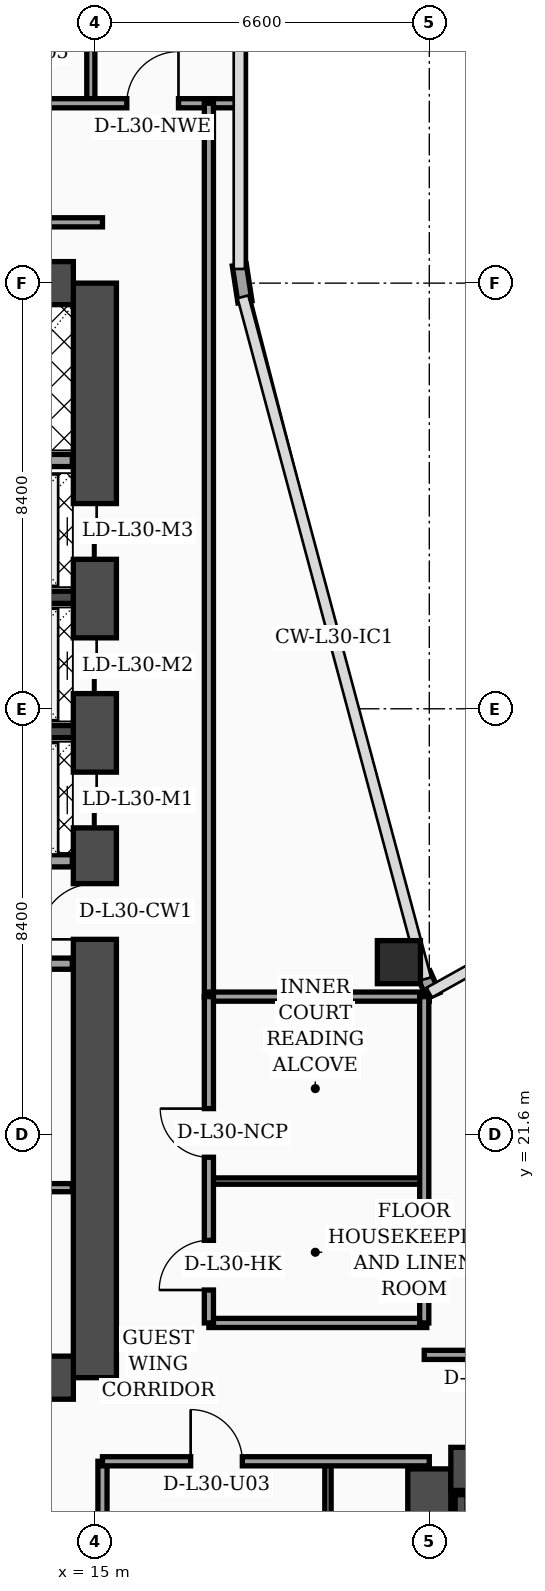
"""IFC4 building model, lengths in metres.
Left out: names, types, materials, properties, quantities, classifications, styles, units other than length and angle.
Written with IfcOpenShell. Run it as: python <this file> out.ifc"""

import sys

from ifc_helpers import new_model, si_unit, direction, frame, frame_2d, origin, origin_2d, place, context, subcontext, project, spatial, rectangle, hollow_rectangle, extrude, element, fill, save


model = new_model("IFC4")
c1 = context("Model", 3, precision=1e-05, world=origin(), true_north=direction((0.0, 1.0)))
c2 = subcontext(c1, "Body", "Model", "MODEL_VIEW")
j1 = project(units=[si_unit("LENGTHUNIT", "METRE"), si_unit("PLANEANGLEUNIT", "RADIAN")], contexts=[c1])
p1 = place(None, origin())
s1 = spatial("IfcSite", under=j1, at=p1, CompositionType="ELEMENT")
p2 = place(p1, origin())
s2 = spatial("IfcBuilding", under=s1, at=p2, CompositionType="ELEMENT")
p3 = place(p2, frame((0.0, 0.0, 124.0)))
s3 = spatial("IfcBuildingStorey", under=s2, at=p3, CompositionType="ELEMENT", Elevation=124.0)
p4 = place(p3, frame((15.0, 16.8, 0.0), z_axis=(0.0, 0.0, 1.0), x_axis=(0.0, 1.0, 0.0)))
e1 = element("IfcWall", 1, at=p4, inside=s3, PredefinedType="SHEAR", context=c2, shape_type="SweptSolid", body=[
    extrude(rectangle(XDim=21.6, YDim=0.85, at=frame_2d((10.8, 0.0))), origin(), (0.0, 0.0, 1.0), 3.56),
])
p5 = place(p4, frame((8.65, 0.0, 0.0)))
e2 = element("IfcOpeningElement", 2, at=p5, cuts=e1, PredefinedType="OPENING", context=c2, shape_type="SweptSolid", body=[
    extrude(rectangle(XDim=1.1, YDim=2.2, at=frame_2d((0.55, 1.1))), frame((0.0, 0.435, 0.0), z_axis=(0.0, -1.0, 0.0), x_axis=(1.0, 0.0, 0.0)), (0.0, 0.0, 1.0), 0.87),
])
p6 = place(p4, frame((10.85, 0.0, 0.0)))
e3 = element("IfcOpeningElement", 3, at=p6, cuts=e1, PredefinedType="OPENING", context=c2, shape_type="SweptSolid", body=[
    extrude(rectangle(XDim=1.1, YDim=2.2, at=frame_2d((0.55, 1.1))), frame((0.0, 0.435, 0.0), z_axis=(0.0, -1.0, 0.0), x_axis=(1.0, 0.0, 0.0)), (0.0, 0.0, 1.0), 0.87),
])
p7 = place(p4, frame((13.5, 0.0, 0.0)))
e4 = element("IfcOpeningElement", 4, at=p7, cuts=e1, PredefinedType="OPENING", context=c2, shape_type="SweptSolid", body=[
    extrude(rectangle(XDim=1.1, YDim=2.2, at=frame_2d((0.55, 1.1))), frame((0.0, 0.435, 0.0), z_axis=(0.0, -1.0, 0.0), x_axis=(1.0, 0.0, 0.0)), (0.0, 0.0, 1.0), 0.87),
])
p8 = place(p4, frame((16.15, 0.0, 0.0)))
e5 = element("IfcOpeningElement", 5, at=p8, cuts=e1, PredefinedType="OPENING", context=c2, shape_type="SweptSolid", body=[
    extrude(rectangle(XDim=1.1, YDim=2.2, at=frame_2d((0.55, 1.1))), frame((0.0, 0.435, 0.0), z_axis=(0.0, -1.0, 0.0), x_axis=(1.0, 0.0, 0.0)), (0.0, 0.0, 1.0), 0.87),
])
for number, where, z_axis, x_axis in (
    (6, (4.625, 38.4, 0.0), (0.0, 0.0, 1.0), (1.0, 0.0, 0.0)),
    (7, (4.625, 16.8, 0.0), (0.0, 0.0, 1.0), (1.0, 0.0, 0.0)),
):
    element("IfcWall", number, at=place(p3, frame(where, z_axis=z_axis, x_axis=x_axis)), inside=s3, PredefinedType="SHEAR", context=c2, shape_type="SweptSolid", body=[
        extrude(rectangle(XDim=9.95, YDim=0.85, at=frame_2d((4.975, 0.0))), origin(), (0.0, 0.0, 1.0), 3.56),
    ])
p9 = place(p3, frame((21.6, 4.6, 0.0), z_axis=(0.0, 0.0, 1.0), x_axis=(0.0, 1.0, 0.0)))
e8 = element("IfcWall", 8, at=p9, inside=s3, PredefinedType="SHEAR", context=c2, shape_type="SweptSolid", body=[
    extrude(rectangle(XDim=10.4, YDim=0.85, at=frame_2d((5.2, 0.0))), origin(), (0.0, 0.0, 1.0), 3.56),
])
p10 = place(p3, frame((22.025, 15.0, 0.0), z_axis=(0.0, 0.0, 1.0), x_axis=(1.0, 0.0, 0.0)))
e9 = element("IfcWall", 9, at=p10, inside=s3, PredefinedType="SHEAR", context=c2, shape_type="SweptSolid", body=[
    extrude(rectangle(XDim=9.95, YDim=0.85, at=frame_2d((4.975, 0.0))), origin(), (0.0, 0.0, 1.0), 3.56),
])
p11 = place(p10, frame((4.88, 0.0, 0.0)))
e10 = element("IfcOpeningElement", 10, at=p11, cuts=e9, PredefinedType="OPENING", context=c2, shape_type="SweptSolid", body=[
    extrude(rectangle(XDim=1.1, YDim=2.2, at=frame_2d((0.55, 1.1))), frame((0.0, 0.435, 0.0), z_axis=(0.0, -1.0, 0.0), x_axis=(1.0, 0.0, 0.0)), (0.0, 0.0, 1.0), 0.87),
])
p12 = place(p3, frame((22.23, 5.025, 0.0), z_axis=(0.0, 0.0, 1.0), x_axis=(0.0, 1.0, 0.0)))
e11 = element("IfcWall", 11, at=p12, inside=s3, PredefinedType="SOLIDWALL", context=c2, shape_type="SweptSolid", body=[
    extrude(rectangle(XDim=9.465, YDim=0.24, at=frame_2d((4.732, 0.0))), origin(), (0.0, 0.0, 1.0), 3.56),
])
for number, where, z_axis, x_axis in (
    (12, (12.18, 29.55, 0.0), (0.0, 0.0, 1.0), (1.0, 0.0, 0.0)),
    (13, (12.18, 32.2, 0.0), (0.0, 0.0, 1.0), (1.0, 0.0, 0.0)),
):
    element("IfcWall", number, at=place(p3, frame(where, z_axis=z_axis, x_axis=x_axis)), inside=s3, PredefinedType="SOLIDWALL", context=c2, shape_type="SweptSolid", body=[
        extrude(rectangle(XDim=2.395, YDim=0.24, at=frame_2d((1.198, 0.0))), origin(), (0.0, 0.0, 1.0), 3.56),
    ])
p13 = place(p3, frame((21.0, 25.0, 0.0), z_axis=(0.0, 0.0, 1.0), x_axis=(1.0, 0.0, 0.0)))
e14 = element("IfcColumn", 14, at=p13, inside=s3, PredefinedType="COLUMN", context=c2, shape_type="SweptSolid", body=[
    extrude(hollow_rectangle(XDim=0.85, YDim=0.85, WallThickness=0.036, at=origin_2d()), origin(), (0.0, 0.0, 1.0), 3.56),
])
p14 = place(p3, frame((21.68, 24.34, 0.0), z_axis=(0.0, 0.0, 1.0), x_axis=(-0.40758134973, 0.913168901875, 0.0)))
e15 = element("IfcWall", 15, at=p14, inside=s3, PredefinedType="SOLIDWALL", context=c2, shape_type="SweptSolid", body=[
    extrude(rectangle(XDim=0.471, YDim=0.28, at=frame_2d((0.235, 0.0))), origin(), (0.0, 0.0, 1.0), 3.56),
])
p15 = place(p3, frame((17.962, 38.03, 0.0), z_axis=(0.0, 0.0, 1.0), x_axis=(-0.15141125477, 0.988470855377, 0.0)))
e16 = element("IfcWall", 16, at=p15, inside=s3, PredefinedType="SOLIDWALL", context=c2, shape_type="SweptSolid", body=[
    extrude(rectangle(XDim=0.739, YDim=0.28, at=frame_2d((0.369, 0.0))), origin(), (0.0, 0.0, 1.0), 3.56),
])
p16 = place(p3, frame((9.68, 20.55, 0.0), z_axis=(0.0, 0.0, 1.0), x_axis=(1.0, 0.0, 0.0)))
e17 = element("IfcWall", 17, at=p16, inside=s3, PredefinedType="PARTITIONING", context=c2, shape_type="SweptSolid", body=[
    extrude(rectangle(XDim=4.875, YDim=0.16, at=frame_2d((2.438, 0.0))), origin(), (0.0, 0.0, 1.0), 3.56),
])
p17 = place(p16, frame((1.1, 0.0, 0.0)))
e18 = element("IfcOpeningElement", 18, at=p17, cuts=e17, PredefinedType="OPENING", context=c2, shape_type="SweptSolid", body=[
    extrude(rectangle(XDim=0.98, YDim=2.15, at=frame_2d((0.49, 1.075))), frame((0.0, 0.09, 0.0), z_axis=(0.0, -1.0, 0.0), x_axis=(1.0, 0.0, 0.0)), (0.0, 0.0, 1.0), 0.18),
])
p18 = place(p3, frame((9.68, 24.97, 0.0), z_axis=(0.0, 0.0, 1.0), x_axis=(1.0, 0.0, 0.0)))
e19 = element("IfcWall", 19, at=p18, inside=s3, PredefinedType="SOLIDWALL", context=c2, shape_type="SweptSolid", body=[
    extrude(rectangle(XDim=4.875, YDim=0.22, at=frame_2d((2.438, 0.0))), origin(), (0.0, 0.0, 1.0), 2.84),
])
p19 = place(p18, frame((0.9, 0.0, 0.0)))
e20 = element("IfcOpeningElement", 20, at=p19, cuts=e19, PredefinedType="OPENING", context=c2, shape_type="SweptSolid", body=[
    extrude(rectangle(XDim=0.98, YDim=2.15, at=frame_2d((0.49, 1.075))), frame((0.0, 0.12, 0.0), z_axis=(0.0, -1.0, 0.0), x_axis=(1.0, 0.0, 0.0)), (0.0, 0.0, 1.0), 0.24),
])
p20 = place(p3, frame((12.25, 27.0, 0.0), z_axis=(0.0, 0.0, 1.0), x_axis=(1.0, 0.0, 0.0)))
e21 = element("IfcWall", 21, at=p20, inside=s3, PredefinedType="SOLIDWALL", context=c2, shape_type="SweptSolid", body=[
    extrude(rectangle(XDim=2.305, YDim=0.24, at=frame_2d((1.152, 0.0))), origin(), (0.0, 0.0, 1.0), 3.56),
])
p21 = place(p3, frame((9.66, 34.9, 0.0), z_axis=(0.0, 0.0, 1.0), x_axis=(1.0, 0.0, 0.0)))
e22 = element("IfcWall", 22, at=p21, inside=s3, PredefinedType="SOLIDWALL", context=c2, shape_type="SweptSolid", body=[
    extrude(rectangle(XDim=4.895, YDim=0.24, at=frame_2d((2.448, 0.0))), origin(), (0.0, 0.0, 1.0), 3.56),
])
p22 = place(p3, frame((15.15, 2.44, 0.0), z_axis=(0.0, 0.0, 1.0), x_axis=(0.0, 1.0, 0.0)))
e23 = element("IfcWall", 23, at=p22, inside=s3, PredefinedType="PARTITIONING", context=c2, shape_type="SweptSolid", body=[
    extrude(rectangle(XDim=12.71, YDim=0.18, at=frame_2d((6.355, 0.0))), origin(), (0.0, 0.0, 1.0), 3.04),
])
p23 = place(p3, frame((19.6, 2.44, 0.0), z_axis=(0.0, 0.0, 1.0), x_axis=(0.0, 1.0, 0.0)))
e24 = element("IfcWall", 24, at=p23, inside=s3, PredefinedType="PARTITIONING", context=c2, shape_type="SweptSolid", body=[
    extrude(rectangle(XDim=12.71, YDim=0.125, at=frame_2d((6.355, 0.0))), origin(), (0.0, 0.0, 1.0), 2.49),
])
p24 = place(p23, frame((4.34, 0.0, 0.0)))
e25 = element("IfcOpeningElement", 25, at=p24, cuts=e24, PredefinedType="OPENING", context=c2, shape_type="SweptSolid", body=[
    extrude(rectangle(XDim=0.96, YDim=2.2, at=frame_2d((0.48, 1.1))), frame((0.0, 0.073, 0.0), z_axis=(0.0, -1.0, 0.0), x_axis=(1.0, 0.0, 0.0)), (0.0, 0.0, 1.0), 0.145),
])
p25 = place(p23, frame((10.18, 0.0, 0.0)))
e26 = element("IfcOpeningElement", 26, at=p25, cuts=e24, PredefinedType="OPENING", context=c2, shape_type="SweptSolid", body=[
    extrude(rectangle(XDim=0.9, YDim=2.15, at=frame_2d((0.45, 1.075))), frame((0.0, 0.073, 0.0), z_axis=(0.0, -1.0, 0.0), x_axis=(1.0, 0.0, 0.0)), (0.0, 0.0, 1.0), 0.145),
])
p26 = place(p3, frame((15.15, 15.15, 0.0), z_axis=(0.0, 0.0, 1.0), x_axis=(1.0, 0.0, 0.0)))
e27 = element("IfcWall", 27, at=p26, inside=s3, PredefinedType="PARTITIONING", context=c2, shape_type="SweptSolid", body=[
    extrude(rectangle(XDim=6.45, YDim=0.18, at=frame_2d((3.225, 0.0))), origin(), (0.0, 0.0, 1.0), 2.49),
])
p27 = place(p26, frame((1.74, 0.0, 0.0)))
e28 = element("IfcOpeningElement", 28, at=p27, cuts=e27, PredefinedType="OPENING", context=c2, shape_type="SweptSolid", body=[
    extrude(rectangle(XDim=1.02, YDim=2.2, at=frame_2d((0.51, 1.1))), frame((0.0, 0.1, 0.0), z_axis=(0.0, -1.0, 0.0), x_axis=(1.0, 0.0, 0.0)), (0.0, 0.0, 1.0), 0.2),
])
p28 = place(p3, frame((14.92, 41.95, 0.0), z_axis=(0.0, 0.0, 1.0), x_axis=(0.0, 1.0, 0.0)))
e29 = element("IfcWall", 29, at=p28, inside=s3, PredefinedType="PARTITIONING", context=c2, shape_type="SweptSolid", body=[
    extrude(rectangle(XDim=5.85, YDim=0.16, at=frame_2d((2.925, 0.0))), origin(), (0.0, 0.0, 1.0), 3.04),
])
p29 = place(p3, frame((0.08, 41.95, 0.0), z_axis=(0.0, 0.0, 1.0), x_axis=(1.0, 0.0, 0.0)))
e30 = element("IfcWall", 30, at=p29, inside=s3, PredefinedType="PARTITIONING", context=c2, shape_type="SweptSolid", body=[
    extrude(rectangle(XDim=17.77, YDim=0.18, at=frame_2d((8.885, 0.0))), origin(), (0.0, 0.0, 1.0), 2.84),
])
p30 = place(p29, frame((0.9, 0.0, 0.0)))
e31 = element("IfcOpeningElement", 31, at=p30, cuts=e30, PredefinedType="OPENING", context=c2, shape_type="SweptSolid", body=[
    extrude(rectangle(XDim=1.02, YDim=2.2, at=frame_2d((0.51, 1.1))), frame((0.0, 0.1, 0.0), z_axis=(0.0, -1.0, 0.0), x_axis=(1.0, 0.0, 0.0)), (0.0, 0.0, 1.0), 0.2),
])
p31 = place(p29, frame((4.75, 0.0, 0.0)))
e32 = element("IfcOpeningElement", 32, at=p31, cuts=e30, PredefinedType="OPENING", context=c2, shape_type="SweptSolid", body=[
    extrude(rectangle(XDim=1.02, YDim=2.2, at=frame_2d((0.51, 1.1))), frame((0.0, 0.1, 0.0), z_axis=(0.0, -1.0, 0.0), x_axis=(1.0, 0.0, 0.0)), (0.0, 0.0, 1.0), 0.2),
])
p32 = place(p29, frame((10.63, 0.0, 0.0)))
e33 = element("IfcOpeningElement", 33, at=p32, cuts=e30, PredefinedType="OPENING", context=c2, shape_type="SweptSolid", body=[
    extrude(rectangle(XDim=1.02, YDim=2.2, at=frame_2d((0.51, 1.1))), frame((0.0, 0.1, 0.0), z_axis=(0.0, -1.0, 0.0), x_axis=(1.0, 0.0, 0.0)), (0.0, 0.0, 1.0), 0.2),
])
p33 = place(p29, frame((15.55, 0.0, 0.0)))
e34 = element("IfcOpeningElement", 34, at=p33, cuts=e30, PredefinedType="OPENING", context=c2, shape_type="SweptSolid", body=[
    extrude(rectangle(XDim=1.02, YDim=2.2, at=frame_2d((0.51, 1.1))), frame((0.0, 0.1, 0.0), z_axis=(0.0, -1.0, 0.0), x_axis=(1.0, 0.0, 0.0)), (0.0, 0.0, 1.0), 0.2),
])
p34 = place(p3, frame((17.25, 24.3, 0.0), z_axis=(0.0, 0.0, 1.0), x_axis=(0.0, 1.0, 0.0)))
e35 = element("IfcWall", 35, at=p34, inside=s3, PredefinedType="PARTITIONING", context=c2, shape_type="SweptSolid", body=[
    extrude(rectangle(XDim=17.65, YDim=0.18, at=frame_2d((8.825, 0.0))), origin(), (0.0, 0.0, 1.0), 2.84),
])
p35 = place(p3, frame((3.755, 39.6, 0.0), z_axis=(0.0, 0.0, 1.0), x_axis=(1.0, 0.0, 0.0)))
e36 = element("IfcWall", 36, at=p35, inside=s3, PredefinedType="PARTITIONING", context=c2, shape_type="SweptSolid", body=[
    extrude(rectangle(XDim=11.395, YDim=0.18, at=frame_2d((5.698, 0.0))), origin(), (0.0, 0.0, 1.0), 2.84),
])
p36 = place(p3, frame((17.25, 17.88, 0.0), z_axis=(0.0, 0.0, 1.0), x_axis=(1.0, 0.0, 0.0)))
e37 = element("IfcWall", 37, at=p36, inside=s3, PredefinedType="PARTITIONING", context=c2, shape_type="SweptSolid", body=[
    extrude(rectangle(XDim=4.3, YDim=0.18, at=frame_2d((2.15, 0.0))), origin(), (0.0, 0.0, 1.0), 3.09),
])
p37 = place(p3, frame((17.25, 20.68, 0.0), z_axis=(0.0, 0.0, 1.0), x_axis=(1.0, 0.0, 0.0)))
e38 = element("IfcWall", 38, at=p37, inside=s3, PredefinedType="PARTITIONING", context=c2, shape_type="SweptSolid", body=[
    extrude(rectangle(XDim=4.3, YDim=0.125, at=frame_2d((2.15, 0.0))), origin(), (0.0, 0.0, 1.0), 3.56),
])
p38 = place(p3, frame((17.25, 24.32, 0.0), z_axis=(0.0, 0.0, 1.0), x_axis=(1.0, 0.0, 0.0)))
e39 = element("IfcWall", 39, at=p38, inside=s3, PredefinedType="PARTITIONING", context=c2, shape_type="SweptSolid", body=[
    extrude(rectangle(XDim=4.35, YDim=0.18, at=frame_2d((2.175, 0.0))), origin(), (0.0, 0.0, 1.0), 3.56),
])
p39 = place(p3, frame((21.5, 17.88, 0.0), z_axis=(0.0, 0.0, 1.0), x_axis=(0.0, 1.0, 0.0)))
e40 = element("IfcWall", 40, at=p39, inside=s3, PredefinedType="PARTITIONING", context=c2, shape_type="SweptSolid", body=[
    extrude(rectangle(XDim=6.44, YDim=0.18, at=frame_2d((3.22, 0.0))), origin(), (0.0, 0.0, 1.0), 3.09),
])
p40 = place(p3, frame((17.25, 17.88, 0.0), z_axis=(0.0, 0.0, 1.0), x_axis=(0.0, 1.0, 0.0)))
e41 = element("IfcWall", 41, at=p40, inside=s3, PredefinedType="PARTITIONING", context=c2, shape_type="SweptSolid", body=[
    extrude(rectangle(XDim=6.44, YDim=0.18, at=frame_2d((3.22, 0.0))), origin(), (0.0, 0.0, 1.0), 3.09),
])
p41 = place(p40, frame((0.65, 0.0, 0.0)))
e42 = element("IfcOpeningElement", 42, at=p41, cuts=e41, PredefinedType="OPENING", context=c2, shape_type="SweptSolid", body=[
    extrude(rectangle(XDim=0.98, YDim=2.15, at=frame_2d((0.49, 1.075))), frame((0.0, 0.1, 0.0), z_axis=(0.0, -1.0, 0.0), x_axis=(1.0, 0.0, 0.0)), (0.0, 0.0, 1.0), 0.2),
])
p42 = place(p40, frame((3.27, 0.0, 0.0)))
e43 = element("IfcOpeningElement", 43, at=p42, cuts=e41, PredefinedType="OPENING", context=c2, shape_type="SweptSolid", body=[
    extrude(rectangle(XDim=0.96, YDim=2.2, at=frame_2d((0.48, 1.1))), frame((0.0, 0.1, 0.0), z_axis=(0.0, -1.0, 0.0), x_axis=(1.0, 0.0, 0.0)), (0.0, 0.0, 1.0), 0.2),
])
p43 = place(p3, frame((21.5, 17.25, 0.0), z_axis=(0.0, 0.0, 1.0), x_axis=(1.0, 0.0, 0.0)))
e44 = element("IfcWall", 44, at=p43, inside=s3, PredefinedType="PARTITIONING", context=c2, shape_type="SweptSolid", body=[
    extrude(rectangle(XDim=24.25, YDim=0.18, at=frame_2d((12.125, 0.0))), origin(), (0.0, 0.0, 1.0), 2.84),
])
p44 = place(p43, frame((0.95, 0.0, 0.0)))
e45 = element("IfcOpeningElement", 45, at=p44, cuts=e44, PredefinedType="OPENING", context=c2, shape_type="SweptSolid", body=[
    extrude(rectangle(XDim=1.02, YDim=2.2, at=frame_2d((0.51, 1.1))), frame((0.0, 0.1, 0.0), z_axis=(0.0, -1.0, 0.0), x_axis=(1.0, 0.0, 0.0)), (0.0, 0.0, 1.0), 0.2),
])
p45 = place(p43, frame((9.0, 0.0, 0.0)))
e46 = element("IfcOpeningElement", 46, at=p45, cuts=e44, PredefinedType="OPENING", context=c2, shape_type="SweptSolid", body=[
    extrude(rectangle(XDim=1.02, YDim=2.2, at=frame_2d((0.51, 1.1))), frame((0.0, 0.1, 0.0), z_axis=(0.0, -1.0, 0.0), x_axis=(1.0, 0.0, 0.0)), (0.0, 0.0, 1.0), 0.2),
])
p46 = place(p43, frame((17.05, 0.0, 0.0)))
e47 = element("IfcOpeningElement", 47, at=p46, cuts=e44, PredefinedType="OPENING", context=c2, shape_type="SweptSolid", body=[
    extrude(rectangle(XDim=1.02, YDim=2.2, at=frame_2d((0.51, 1.1))), frame((0.0, 0.1, 0.0), z_axis=(0.0, -1.0, 0.0), x_axis=(1.0, 0.0, 0.0)), (0.0, 0.0, 1.0), 0.2),
])
p47 = place(p27, origin())
e48 = element("IfcDoor", 48, at=p47, inside=s3, OperationType="SINGLE_SWING_LEFT", PredefinedType="DOOR", context=c2, shape_type="SweptSolid", body=[
    extrude(rectangle(XDim=1.02, YDim=2.2, at=frame_2d((0.51, 1.1))), frame((0.0, 0.025, 0.0), z_axis=(0.0, -1.0, 0.0), x_axis=(1.0, 0.0, 0.0)), (0.0, 0.0, 1.0), 0.05),
])
fill(e28, e48)
p48 = place(p33, origin())
e49 = element("IfcDoor", 49, at=p48, inside=s3, OperationType="SINGLE_SWING_RIGHT", PredefinedType="DOOR", context=c2, shape_type="SweptSolid", body=[
    extrude(rectangle(XDim=1.02, YDim=2.2, at=frame_2d((0.51, 1.1))), frame((0.0, 0.025, 0.0), z_axis=(0.0, -1.0, 0.0), x_axis=(1.0, 0.0, 0.0)), (0.0, 0.0, 1.0), 0.05),
])
fill(e34, e49)
p49 = place(p41, origin())
e50 = element("IfcDoor", 50, at=p49, inside=s3, OperationType="SINGLE_SWING_LEFT", PredefinedType="DOOR", context=c2, shape_type="SweptSolid", body=[
    extrude(rectangle(XDim=0.98, YDim=2.15, at=frame_2d((0.49, 1.075))), frame((0.0, 0.025, 0.0), z_axis=(0.0, -1.0, 0.0), x_axis=(1.0, 0.0, 0.0)), (0.0, 0.0, 1.0), 0.05),
])
fill(e42, e50)
p50 = place(p42, origin())
e51 = element("IfcDoor", 51, at=p50, inside=s3, OperationType="SINGLE_SWING_RIGHT", PredefinedType="DOOR", context=c2, shape_type="SweptSolid", body=[
    extrude(rectangle(XDim=0.96, YDim=2.2, at=frame_2d((0.48, 1.1))), frame((0.0, 0.025, 0.0), z_axis=(0.0, -1.0, 0.0), x_axis=(1.0, 0.0, 0.0)), (0.0, 0.0, 1.0), 0.05),
])
fill(e43, e51)
p51 = place(p5, origin())
e52 = element("IfcDoor", 52, at=p51, inside=s3, OperationType="SINGLE_SWING_LEFT", PredefinedType="DOOR", context=c2, shape_type="SweptSolid", body=[
    extrude(rectangle(XDim=1.1, YDim=2.2, at=frame_2d((0.55, 1.1))), frame((0.0, 0.025, 0.0), z_axis=(0.0, -1.0, 0.0), x_axis=(1.0, 0.0, 0.0)), (0.0, 0.0, 1.0), 0.05),
])
fill(e2, e52)
p52 = place(p6, origin())
e53 = element("IfcDoor", 53, at=p52, inside=s3, OperationType="DOUBLE_DOOR_SLIDING", PredefinedType="DOOR", context=c2, shape_type="SweptSolid", body=[
    extrude(rectangle(XDim=1.1, YDim=2.2, at=frame_2d((0.55, 1.1))), frame((0.0, 0.025, 0.0), z_axis=(0.0, -1.0, 0.0), x_axis=(1.0, 0.0, 0.0)), (0.0, 0.0, 1.0), 0.05),
])
fill(e3, e53)
p53 = place(p7, origin())
e54 = element("IfcDoor", 54, at=p53, inside=s3, OperationType="DOUBLE_DOOR_SLIDING", PredefinedType="DOOR", context=c2, shape_type="SweptSolid", body=[
    extrude(rectangle(XDim=1.1, YDim=2.2, at=frame_2d((0.55, 1.1))), frame((0.0, 0.025, 0.0), z_axis=(0.0, -1.0, 0.0), x_axis=(1.0, 0.0, 0.0)), (0.0, 0.0, 1.0), 0.05),
])
fill(e4, e54)
p54 = place(p8, origin())
e55 = element("IfcDoor", 55, at=p54, inside=s3, OperationType="DOUBLE_DOOR_SLIDING", PredefinedType="DOOR", context=c2, shape_type="SweptSolid", body=[
    extrude(rectangle(XDim=1.1, YDim=2.2, at=frame_2d((0.55, 1.1))), frame((0.0, 0.025, 0.0), z_axis=(0.0, -1.0, 0.0), x_axis=(1.0, 0.0, 0.0)), (0.0, 0.0, 1.0), 0.05),
])
fill(e5, e55)
save(model, sys.argv[1])
